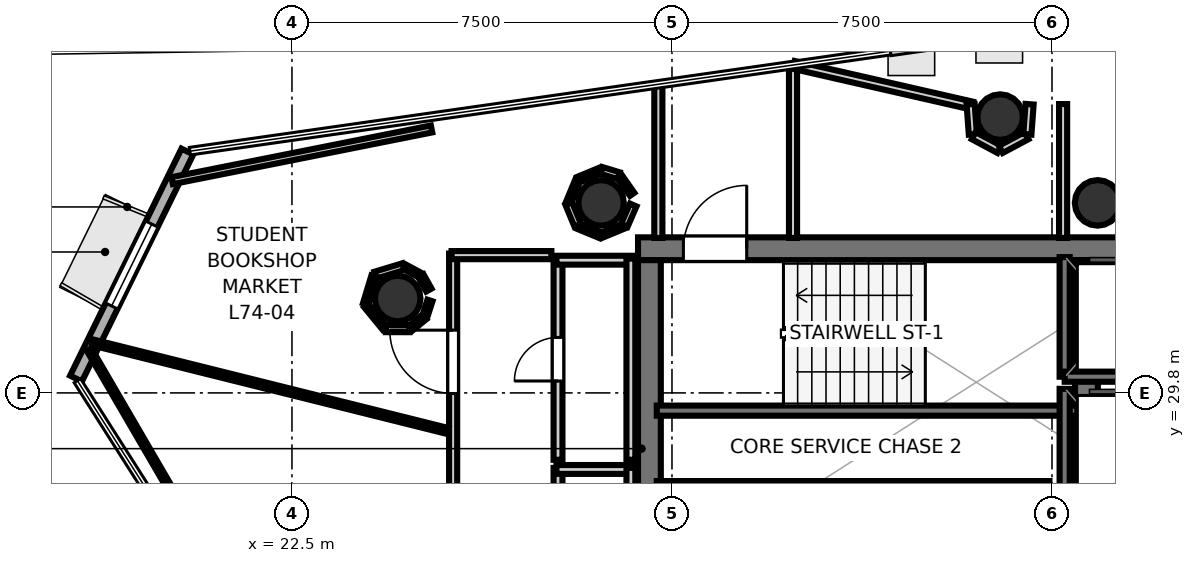
"""IFC4 building model, lengths in metres.
Left out: names, types, materials, properties, quantities, classifications, styles, units other than length and angle.
Written with IfcOpenShell. Run it as: python <this file> out.ifc"""

import sys

from ifc_helpers import new_model, si_unit, direction, frame, frame_2d, origin, origin_2d, place, context, subcontext, project, spatial, rectangle, hollow_circle, extrude, element, fill, save


model = new_model("IFC4")
c1 = context("Model", 3, precision=1e-05, world=origin(), true_north=direction((0.0, 1.0)))
c2 = subcontext(c1, "Body", "Model", "MODEL_VIEW")
j1 = project(units=[si_unit("LENGTHUNIT", "METRE"), si_unit("PLANEANGLEUNIT", "RADIAN")], contexts=[c1])
p1 = place(None, origin())
s1 = spatial("IfcSite", under=j1, at=p1, CompositionType="ELEMENT")
p2 = place(p1, origin())
s2 = spatial("IfcBuilding", under=s1, at=p2, CompositionType="ELEMENT")
p3 = place(p2, frame((0.0, 0.0, 288.0)))
s3 = spatial("IfcBuildingStorey", under=s2, at=p3, CompositionType="ELEMENT", Elevation=288.0)
p4 = place(p3, frame((29.33, 32.645, 0.0), z_axis=(0.0, 0.0, 1.0), x_axis=(1.0, 0.0, 0.0)))
e1 = element("IfcWall", 1, at=p4, inside=s3, PredefinedType="SHEAR", context=c2, shape_type="SweptSolid", body=[
    extrude(rectangle(XDim=10.52, YDim=0.45, at=frame_2d((5.26, 0.0))), origin(), (0.0, 0.0, 1.0), 3.52),
])
p5 = place(p4, frame((0.895, 0.0, 0.0)))
e2 = element("IfcOpeningElement", 2, at=p5, cuts=e1, PredefinedType="OPENING", context=c2, shape_type="SweptSolid", body=[
    extrude(rectangle(XDim=1.25, YDim=2.15, at=frame_2d((0.625, 1.075))), frame((0.0, 0.235, 0.0), z_axis=(0.0, -1.0, 0.0), x_axis=(1.0, 0.0, 0.0)), (0.0, 0.0, 1.0), 0.47),
])
for number, where, z_axis, x_axis in (
    (3, (29.555, 24.98, 0.0), (0.0, 0.0, 1.0), (0.0, 1.0, 0.0)),
    (4, (38.18, 24.98, 0.0), (0.0, 0.0, 1.0), (0.0, 1.0, 0.0)),
):
    element("IfcWall", number, at=place(p3, frame(where, z_axis=z_axis, x_axis=x_axis)), inside=s3, PredefinedType="SHEAR", context=c2, shape_type="SweptSolid", body=[
        extrude(rectangle(XDim=7.44, YDim=0.45, at=frame_2d((3.72, 0.0))), origin(), (0.0, 0.0, 1.0), 3.52),
    ])
for number, where, z_axis, x_axis in (
    (5, (28.6, 33.55, 0.0), (0.0, 0.0, 1.0), (1.0, 0.0, 0.0)),
    (6, (38.4, 33.55, 0.0), (0.0, 0.0, 1.0), (1.0, 0.0, 0.0)),
    (7, (36.476, 35.243, 0.0), (0.0, 0.0, 1.0), (1.0, 0.0, 0.0)),
    (8, (24.587, 31.663, 0.0), (0.0, 0.0, 1.0), (1.0, 0.0, 0.0)),
):
    element("IfcColumn", number, at=place(p3, frame(where, z_axis=z_axis, x_axis=x_axis)), inside=s3, PredefinedType="COLUMN", context=c2, shape_type="SweptSolid", body=[
        extrude(hollow_circle(Radius=0.45, WallThickness=0.025, at=origin_2d()), origin(), (0.0, 0.0, 1.0), 3.7),
    ])
p6 = place(p3, frame((20.436, 34.563, 0.0), z_axis=(0.0, 0.0, 1.0), x_axis=(-0.440488239438, -0.897758381145, 0.0)))
e9 = element("IfcWall", 9, at=p6, inside=s3, PredefinedType="SOLIDWALL", context=c2, shape_type="SweptSolid", body=[
    extrude(rectangle(XDim=4.99, YDim=0.26, at=frame_2d((2.495, 0.0))), origin(), (0.0, 0.0, 1.0), 3.52),
])
p7 = place(p6, frame((1.595, 0.0, 0.85)))
e10 = element("IfcOpeningElement", 10, at=p7, cuts=e9, PredefinedType="OPENING", context=c2, shape_type="SweptSolid", body=[
    extrude(rectangle(XDim=1.8, YDim=2.1, at=frame_2d((0.9, 1.05))), frame((0.0, 0.14, 0.0), z_axis=(0.0, -1.0, 0.0), x_axis=(1.0, 0.0, 0.0)), (0.0, 0.0, 1.0), 0.28),
])
p8 = place(p3, frame((29.7, 29.45, 0.0), z_axis=(0.0, 0.0, 1.0), x_axis=(1.0, 0.0, 0.0)))
e11 = element("IfcWall", 11, at=p8, inside=s3, PredefinedType="SOLIDWALL", context=c2, shape_type="SweptSolid", body=[
    extrude(rectangle(XDim=8.3, YDim=0.2, at=frame_2d((4.15, 0.0))), origin(), (0.0, 0.0, 1.0), 3.52),
])
p9 = place(p3, frame((29.7, 27.96, 0.0), z_axis=(0.0, 0.0, 1.0), x_axis=(1.0, 0.0, 0.0)))
e12 = element("IfcWall", 12, at=p9, inside=s3, PredefinedType="SOLIDWALL", context=c2, shape_type="SweptSolid", body=[
    extrude(rectangle(XDim=7.75, YDim=0.2, at=frame_2d((3.875, 0.0))), origin(), (0.0, 0.0, 1.0), 3.52),
])
p10 = place(p3, frame((37.75, 30.12, 0.0), z_axis=(0.0, 0.0, 1.0), x_axis=(0.0, 1.0, 0.0)))
e13 = element("IfcWall", 13, at=p10, inside=s3, PredefinedType="SOLIDWALL", context=c2, shape_type="SweptSolid", body=[
    extrude(rectangle(XDim=2.36, YDim=0.2, at=frame_2d((1.18, 0.0))), origin(), (0.0, 0.0, 1.0), 3.52),
])
p11 = place(p3, frame((37.75, 30.12, 0.0), z_axis=(0.0, 0.0, 1.0), x_axis=(1.0, 0.0, 0.0)))
e14 = element("IfcWall", 14, at=p11, inside=s3, PredefinedType="SOLIDWALL", context=c2, shape_type="SweptSolid", body=[
    extrude(rectangle(XDim=2.1, YDim=0.2, at=frame_2d((1.05, 0.0))), origin(), (0.0, 0.0, 1.0), 3.52),
])
p12 = place(p3, frame((37.75, 27.52, 0.0), z_axis=(0.0, 0.0, 1.0), x_axis=(0.0, 1.0, 0.0)))
e15 = element("IfcWall", 15, at=p12, inside=s3, PredefinedType="SOLIDWALL", context=c2, shape_type="SweptSolid", body=[
    extrude(rectangle(XDim=2.36, YDim=0.2, at=frame_2d((1.18, 0.0))), origin(), (0.0, 0.0, 1.0), 3.52),
])
p13 = place(p3, frame((29.731, 32.858, 0.0), z_axis=(0.0, 0.0, 1.0), x_axis=(0.0, 1.0, 0.0)))
e16 = element("IfcWall", 16, at=p13, inside=s3, PredefinedType="PARTITIONING", context=c2, shape_type="SweptSolid", body=[
    extrude(rectangle(XDim=3.053, YDim=0.16, at=frame_2d((1.526, 0.0))), origin(), (0.0, 0.0, 1.0), 2.84),
])
p14 = place(p3, frame((32.389, 36.29, 0.0), z_axis=(0.0, 0.0, 1.0), x_axis=(0.0, -1.0, 0.0)))
e17 = element("IfcWall", 17, at=p14, inside=s3, PredefinedType="PARTITIONING", context=c2, shape_type="SweptSolid", body=[
    extrude(rectangle(XDim=3.432, YDim=0.16, at=frame_2d((1.716, 0.0))), origin(), (0.0, 0.0, 1.0), 2.84),
])
p15 = place(p3, frame((27.751, 25.0, 0.0), z_axis=(0.0, 0.0, 1.0), x_axis=(0.0, 1.0, 0.0)))
e18 = element("IfcWall", 18, at=p15, inside=s3, PredefinedType="PLUMBINGWALL", context=c2, shape_type="SweptSolid", body=[
    extrude(rectangle(XDim=3.32, YDim=0.175, at=frame_2d((1.66, 0.0))), origin(), (0.0, 0.0, 1.0), 2.84),
])
p16 = place(p15, frame((1.21, 0.0, 0.0)))
e19 = element("IfcOpeningElement", 19, at=p16, cuts=e18, PredefinedType="OPENING", context=c2, shape_type="SweptSolid", body=[
    extrude(rectangle(XDim=0.9, YDim=2.1, at=frame_2d((0.45, 1.05))), frame((0.0, 0.097, 0.0), z_axis=(0.0, -1.0, 0.0), x_axis=(1.0, 0.0, 0.0)), (0.0, 0.0, 1.0), 0.195),
])
p17 = place(p3, frame((27.72, 28.289, 0.0), z_axis=(0.0, 0.0, 1.0), x_axis=(1.0, 0.0, 0.0)))
e20 = element("IfcWall", 20, at=p17, inside=s3, PredefinedType="PLUMBINGWALL", context=c2, shape_type="SweptSolid", body=[
    extrude(rectangle(XDim=1.5, YDim=0.175, at=frame_2d((0.75, 0.0))), origin(), (0.0, 0.0, 1.0), 2.84),
])
p18 = place(p3, frame((29.189, 28.32, 0.0), z_axis=(0.0, 0.0, 1.0), x_axis=(0.0, -1.0, 0.0)))
e21 = element("IfcWall", 21, at=p18, inside=s3, PredefinedType="PLUMBINGWALL", context=c2, shape_type="SweptSolid", body=[
    extrude(rectangle(XDim=3.32, YDim=0.175, at=frame_2d((1.66, 0.0))), origin(), (0.0, 0.0, 1.0), 2.84),
])
p19 = place(p3, frame((27.751, 28.48, 0.0), z_axis=(0.0, 0.0, 1.0), x_axis=(0.0, 1.0, 0.0)))
e22 = element("IfcWall", 22, at=p19, inside=s3, PredefinedType="PLUMBINGWALL", context=c2, shape_type="SweptSolid", body=[
    extrude(rectangle(XDim=3.97, YDim=0.175, at=frame_2d((1.985, 0.0))), origin(), (0.0, 0.0, 1.0), 2.84),
])
p20 = place(p19, frame((1.555, 0.0, 0.0)))
e23 = element("IfcOpeningElement", 23, at=p20, cuts=e22, PredefinedType="OPENING", context=c2, shape_type="SweptSolid", body=[
    extrude(rectangle(XDim=0.86, YDim=2.05, at=frame_2d((0.43, 1.025))), frame((0.0, 0.097, 0.0), z_axis=(0.0, -1.0, 0.0), x_axis=(1.0, 0.0, 0.0)), (0.0, 0.0, 1.0), 0.195),
])
p21 = place(p3, frame((27.72, 32.419, 0.0), z_axis=(0.0, 0.0, 1.0), x_axis=(1.0, 0.0, 0.0)))
e24 = element("IfcWall", 24, at=p21, inside=s3, PredefinedType="PLUMBINGWALL", context=c2, shape_type="SweptSolid", body=[
    extrude(rectangle(XDim=1.5, YDim=0.175, at=frame_2d((0.75, 0.0))), origin(), (0.0, 0.0, 1.0), 2.84),
])
p22 = place(p3, frame((29.189, 32.45, 0.0), z_axis=(0.0, 0.0, 1.0), x_axis=(0.0, -1.0, 0.0)))
e25 = element("IfcWall", 25, at=p22, inside=s3, PredefinedType="PLUMBINGWALL", context=c2, shape_type="SweptSolid", body=[
    extrude(rectangle(XDim=3.97, YDim=0.175, at=frame_2d((1.985, 0.0))), origin(), (0.0, 0.0, 1.0), 2.84),
])
p23 = place(p3, frame((32.405, 36.272, 0.0), z_axis=(0.0, 0.0, 1.0), x_axis=(0.974921840823, -0.222547532645, 0.0)))
e26 = element("IfcWall", 26, at=p23, inside=s3, PredefinedType="PARTITIONING", context=c2, shape_type="SweptSolid", body=[
    extrude(rectangle(XDim=3.61, YDim=0.16, at=frame_2d((1.805, 0.0))), origin(), (0.0, 0.0, 1.0), 2.84),
])
p24 = place(p3, frame((35.894, 35.498, 0.0), z_axis=(0.0, 0.0, 1.0), x_axis=(0.07354059826, -0.997292224179, 0.0)))
e27 = element("IfcWall", 27, at=p24, inside=s3, PredefinedType="PARTITIONING", context=c2, shape_type="SweptSolid", body=[
    extrude(rectangle(XDim=0.598, YDim=0.16, at=frame_2d((0.299, 0.0))), origin(), (0.0, 0.0, 1.0), 2.84),
])
for number, where, z_axis, x_axis in (
    (28, (35.954, 34.877, 0.0), (0.0, 0.0, 1.0), (0.882, -0.471, 0.0)),
    (29, (36.49, 34.606, 0.0), (0.0, 0.0, 1.0), (0.882, 0.471, 0.0)),
):
    element("IfcWall", number, at=place(p3, frame(where, z_axis=z_axis, x_axis=x_axis)), inside=s3, PredefinedType="PARTITIONING", context=c2, shape_type="SweptSolid", body=[
        extrude(rectangle(XDim=0.575, YDim=0.16, at=frame_2d((0.288, 0.0))), origin(), (0.0, 0.0, 1.0), 2.84),
    ])
p25 = place(p3, frame((37.014, 34.902, 0.0), z_axis=(0.0, 0.0, 1.0), x_axis=(0.073134230676, 0.997322106595, 0.0)))
e30 = element("IfcWall", 30, at=p25, inside=s3, PredefinedType="PARTITIONING", context=c2, shape_type="SweptSolid", body=[
    extrude(rectangle(XDim=0.598, YDim=0.16, at=frame_2d((0.299, 0.0))), origin(), (0.0, 0.0, 1.0), 2.84),
])
p26 = place(p3, frame((37.719, 35.5, 0.0), z_axis=(0.0, 0.0, 1.0), x_axis=(0.0, -1.0, 0.0)))
e31 = element("IfcWall", 31, at=p26, inside=s3, PredefinedType="PARTITIONING", context=c2, shape_type="SweptSolid", body=[
    extrude(rectangle(XDim=2.642, YDim=0.16, at=frame_2d((1.321, 0.0))), origin(), (0.0, 0.0, 1.0), 2.84),
])
p27 = place(p3, frame((25.681, 18.372, 0.0), z_axis=(0.0, 0.0, 1.0), x_axis=(0.0, 1.0, 0.0)))
e32 = element("IfcWall", 32, at=p27, inside=s3, PredefinedType="PARTITIONING", context=c2, shape_type="SweptSolid", body=[
    extrude(rectangle(XDim=14.178, YDim=0.16, at=frame_2d((7.089, 0.0))), origin(), (0.0, 0.0, 1.0), 2.84),
])
p28 = place(p27, frame((11.417, 0.0, 0.0)))
e33 = element("IfcOpeningElement", 33, at=p28, cuts=e32, PredefinedType="OPENING", context=c2, shape_type="SweptSolid", body=[
    extrude(rectangle(XDim=1.25, YDim=2.2, at=frame_2d((0.625, 1.1))), frame((0.0, 0.09, 0.0), z_axis=(0.0, -1.0, 0.0), x_axis=(1.0, 0.0, 0.0)), (0.0, 0.0, 1.0), 0.18),
])
p29 = place(p27, frame((5.215, 0.0, 0.0)))
e34 = element("IfcOpeningElement", 34, at=p29, cuts=e32, PredefinedType="OPENING", context=c2, shape_type="SweptSolid", body=[
    extrude(rectangle(XDim=1.25, YDim=2.2, at=frame_2d((0.625, 1.1))), frame((0.0, 0.09, 0.0), z_axis=(0.0, -1.0, 0.0), x_axis=(1.0, 0.0, 0.0)), (0.0, 0.0, 1.0), 0.18),
])
p30 = place(p3, frame((25.65, 32.519, 0.0), z_axis=(0.0, 0.0, 1.0), x_axis=(1.0, 0.0, 0.0)))
e35 = element("IfcWall", 35, at=p30, inside=s3, PredefinedType="PARTITIONING", context=c2, shape_type="SweptSolid", body=[
    extrude(rectangle(XDim=1.97, YDim=0.16, at=frame_2d((0.985, 0.0))), origin(), (0.0, 0.0, 1.0), 2.84),
])
p31 = place(p3, frame((56.387, 35.955, 0.0), z_axis=(0.0, 0.0, 1.0), x_axis=(-0.547085490545, -0.837076738439, 0.0)))
e36 = element("IfcWall", 36, at=p31, inside=s3, PredefinedType="PARTITIONING", context=c2, shape_type="SweptSolid", body=[
    extrude(rectangle(XDim=34.443, YDim=0.12, at=frame_2d((17.221, 0.0))), origin(), (0.0, 0.0, 1.0), 2.84),
])
p32 = place(p3, frame((25.203, 31.829, 0.0), z_axis=(0.0, 0.0, 1.0), x_axis=(-0.488926990846, 0.872324708823, 0.0)))
e37 = element("IfcWall", 37, at=p32, inside=s3, PredefinedType="PARTITIONING", context=c2, shape_type="SweptSolid", body=[
    extrude(rectangle(XDim=0.322, YDim=0.12, at=frame_2d((0.161, 0.0))), origin(), (0.0, 0.0, 1.0), 2.84),
])
p33 = place(p3, frame((25.033, 32.122, 0.0), z_axis=(0.0, 0.0, 1.0), x_axis=(-0.881817981942, 0.471589913721, 0.0)))
e38 = element("IfcWall", 38, at=p33, inside=s3, PredefinedType="PARTITIONING", context=c2, shape_type="SweptSolid", body=[
    extrude(rectangle(XDim=0.354, YDim=0.105, at=frame_2d((0.177, 0.0))), origin(), (0.0, 0.0, 1.0), 2.84),
])
p34 = place(p3, frame((24.697, 32.291, 0.0), z_axis=(0.0, 0.0, 1.0), x_axis=(-0.956910072495, -0.290384423064, 0.0)))
e39 = element("IfcWall", 39, at=p34, inside=s3, PredefinedType="PARTITIONING", context=c2, shape_type="SweptSolid", body=[
    extrude(rectangle(XDim=0.575, YDim=0.14, at=frame_2d((0.288, 0.0))), origin(), (0.0, 0.0, 1.0), 2.84),
])
p35 = place(p3, frame((24.126, 32.103, 0.0), z_axis=(0.0, 0.0, 1.0), x_axis=(-0.290384423064, -0.956910072495, 0.0)))
e40 = element("IfcWall", 40, at=p35, inside=s3, PredefinedType="PARTITIONING", context=c2, shape_type="SweptSolid", body=[
    extrude(rectangle(XDim=0.575, YDim=0.12, at=frame_2d((0.288, 0.0))), origin(), (0.0, 0.0, 1.0), 2.84),
])
p36 = place(p3, frame((23.965, 31.524, 0.0), z_axis=(0.0, 0.0, 1.0), x_axis=(0.634277575631, -0.77310539841, 0.0)))
e41 = element("IfcWall", 41, at=p36, inside=s3, PredefinedType="PARTITIONING", context=c2, shape_type="SweptSolid", body=[
    extrude(rectangle(XDim=0.575, YDim=0.105, at=frame_2d((0.288, 0.0))), origin(), (0.0, 0.0, 1.0), 2.84),
])
p37 = place(p3, frame((24.354, 31.068, 0.0), z_axis=(0.0, 0.0, 1.0), x_axis=(1.0, 0.0, 0.0)))
e42 = element("IfcWall", 42, at=p37, inside=s3, PredefinedType="PARTITIONING", context=c2, shape_type="SweptSolid", body=[
    extrude(rectangle(XDim=0.467, YDim=0.14, at=frame_2d((0.233, 0.0))), origin(), (0.0, 0.0, 1.0), 2.84),
])
p38 = place(p3, frame((24.84, 31.075, 0.0), z_axis=(0.0, 0.0, 1.0), x_axis=(0.773281307259, 0.634063103992, 0.0)))
e43 = element("IfcWall", 43, at=p38, inside=s3, PredefinedType="PARTITIONING", context=c2, shape_type="SweptSolid", body=[
    extrude(rectangle(XDim=0.354, YDim=0.12, at=frame_2d((0.177, 0.0))), origin(), (0.0, 0.0, 1.0), 2.84),
])
p39 = place(p3, frame((25.124, 31.315, 0.0), z_axis=(0.0, 0.0, 1.0), x_axis=(0.306761714687, 0.951786347035, 0.0)))
e44 = element("IfcWall", 44, at=p39, inside=s3, PredefinedType="PARTITIONING", context=c2, shape_type="SweptSolid", body=[
    extrude(rectangle(XDim=0.325, YDim=0.105, at=frame_2d((0.163, 0.0))), origin(), (0.0, 0.0, 1.0), 2.84),
])
p40 = place(p3, frame((25.577, 29.048, 0.0), z_axis=(0.0, 0.0, 1.0), x_axis=(-0.970297325038, 0.241915483226, 0.0)))
e45 = element("IfcWall", 45, at=p40, inside=s3, PredefinedType="PARTITIONING", context=c2, shape_type="SweptSolid", body=[
    extrude(rectangle(XDim=7.226, YDim=0.12, at=frame_2d((3.613, 0.0))), origin(), (0.0, 0.0, 1.0), 2.84),
])
p41 = place(p3, frame((20.136, 33.989, 0.0), z_axis=(0.0, 0.0, 1.0), x_axis=(0.980720741486, 0.195414501046, 0.0)))
e46 = element("IfcWall", 46, at=p41, inside=s3, PredefinedType="PARTITIONING", context=c2, shape_type="SweptSolid", body=[
    extrude(rectangle(XDim=5.22, YDim=0.14, at=frame_2d((2.61, 0.0))), origin(), (0.0, 0.0, 1.0), 2.84),
])
p42 = place(p3, frame((29.214, 33.719, 0.0), z_axis=(0.0, 0.0, 1.0), x_axis=(-0.57410245878, 0.818783467605, 0.0)))
e47 = element("IfcWall", 47, at=p42, inside=s3, PredefinedType="PARTITIONING", context=c2, shape_type="SweptSolid", body=[
    extrude(rectangle(XDim=0.435, YDim=0.105, at=frame_2d((0.218, 0.0))), origin(), (0.0, 0.0, 1.0), 2.84),
])
p43 = place(p3, frame((28.948, 34.087, 0.0), z_axis=(0.0, 0.0, 1.0), x_axis=(-0.957007018611, 0.290064762301, 0.0)))
e48 = element("IfcWall", 48, at=p43, inside=s3, PredefinedType="PARTITIONING", context=c2, shape_type="SweptSolid", body=[
    extrude(rectangle(XDim=0.354, YDim=0.14, at=frame_2d((0.177, 0.0))), origin(), (0.0, 0.0, 1.0), 2.84),
])
p44 = place(p3, frame((28.588, 34.189, 0.0), z_axis=(0.0, 0.0, 1.0), x_axis=(-0.923863886655, -0.382721202621, 0.0)))
e49 = element("IfcWall", 49, at=p44, inside=s3, PredefinedType="PARTITIONING", context=c2, shape_type="SweptSolid", body=[
    extrude(rectangle(XDim=0.467, YDim=0.12, at=frame_2d((0.233, 0.0))), origin(), (0.0, 0.0, 1.0), 2.84),
])
p45 = place(p3, frame((28.14, 33.993, 0.0), z_axis=(0.0, 0.0, 1.0), x_axis=(-0.382459617246, -0.923972208011, 0.0)))
e50 = element("IfcWall", 50, at=p45, inside=s3, PredefinedType="PARTITIONING", context=c2, shape_type="SweptSolid", body=[
    extrude(rectangle(XDim=0.467, YDim=0.105, at=frame_2d((0.233, 0.0))), origin(), (0.0, 0.0, 1.0), 2.84),
])
p46 = place(p3, frame((27.961, 33.538, 0.0), z_axis=(0.0, 0.0, 1.0), x_axis=(0.382274809242, -0.924048683901, 0.0)))
e51 = element("IfcWall", 51, at=p46, inside=s3, PredefinedType="PARTITIONING", context=c2, shape_type="SweptSolid", body=[
    extrude(rectangle(XDim=0.467, YDim=0.14, at=frame_2d((0.233, 0.0))), origin(), (0.0, 0.0, 1.0), 2.84),
])
p47 = place(p3, frame((28.157, 33.09, 0.0), z_axis=(0.0, 0.0, 1.0), x_axis=(0.923863886655, -0.382721202621, 0.0)))
e52 = element("IfcWall", 52, at=p47, inside=s3, PredefinedType="PARTITIONING", context=c2, shape_type="SweptSolid", body=[
    extrude(rectangle(XDim=0.467, YDim=0.12, at=frame_2d((0.233, 0.0))), origin(), (0.0, 0.0, 1.0), 2.84),
])
p48 = place(p3, frame((28.612, 32.911, 0.0), z_axis=(0.0, 0.0, 1.0), x_axis=(0.923863886655, 0.382721202621, 0.0)))
e53 = element("IfcWall", 53, at=p48, inside=s3, PredefinedType="PARTITIONING", context=c2, shape_type="SweptSolid", body=[
    extrude(rectangle(XDim=0.467, YDim=0.105, at=frame_2d((0.233, 0.0))), origin(), (0.0, 0.0, 1.0), 2.84),
])
p49 = place(p3, frame((29.06, 33.106, 0.0), z_axis=(0.0, 0.0, 1.0), x_axis=(0.400352069216, 0.916361402872, 0.0)))
e54 = element("IfcWall", 54, at=p49, inside=s3, PredefinedType="PARTITIONING", context=c2, shape_type="SweptSolid", body=[
    extrude(rectangle(XDim=0.439, YDim=0.14, at=frame_2d((0.219, 0.0))), origin(), (0.0, 0.0, 1.0), 2.84),
])
p50 = place(p3, frame((22.117, 24.438, 0.0), z_axis=(0.0, 0.0, 1.0), x_axis=(-0.50301807404, 0.864275891825, 0.0)))
e55 = element("IfcWall", 55, at=p50, inside=s3, PredefinedType="PARTITIONING", context=c2, shape_type="SweptSolid", body=[
    extrude(rectangle(XDim=7.192, YDim=0.105, at=frame_2d((3.596, 0.0))), origin(), (0.0, 0.0, 1.0), 2.84),
])
p51 = place(p5, origin())
e56 = element("IfcDoor", 56, at=p51, inside=s3, OperationType="SINGLE_SWING_RIGHT", PredefinedType="DOOR", context=c2, shape_type="SweptSolid", body=[
    extrude(rectangle(XDim=1.25, YDim=2.15, at=frame_2d((0.625, 1.075))), frame((0.0, 0.025, 0.0), z_axis=(0.0, -1.0, 0.0), x_axis=(1.0, 0.0, 0.0)), (0.0, 0.0, 1.0), 0.05),
])
fill(e2, e56)
p52 = place(p20, origin())
e57 = element("IfcDoor", 57, at=p52, inside=s3, OperationType="SINGLE_SWING_LEFT", PredefinedType="DOOR", context=c2, shape_type="SweptSolid", body=[
    extrude(rectangle(XDim=0.86, YDim=2.05, at=frame_2d((0.43, 1.025))), frame((0.0, 0.025, 0.0), z_axis=(0.0, -1.0, 0.0), x_axis=(1.0, 0.0, 0.0)), (0.0, 0.0, 1.0), 0.05),
])
fill(e23, e57)
p53 = place(p28, origin())
e58 = element("IfcDoor", 58, at=p53, inside=s3, OperationType="SINGLE_SWING_RIGHT", PredefinedType="DOOR", context=c2, shape_type="SweptSolid", body=[
    extrude(rectangle(XDim=1.25, YDim=2.2, at=frame_2d((0.625, 1.1))), frame((0.0, 0.025, 0.0), z_axis=(0.0, -1.0, 0.0), x_axis=(1.0, 0.0, 0.0)), (0.0, 0.0, 1.0), 0.05),
])
fill(e33, e58)
p54 = place(p7, origin())
e59 = element("IfcWindow", 59, at=p54, inside=s3, PartitioningType="SINGLE_PANEL", PredefinedType="WINDOW", context=c2, shape_type="SweptSolid", body=[
    extrude(rectangle(XDim=1.8, YDim=2.1, at=frame_2d((0.9, 1.05))), frame((0.0, 0.03, 0.0), z_axis=(0.0, -1.0, 0.0), x_axis=(1.0, 0.0, 0.0)), (0.0, 0.0, 1.0), 0.06),
])
fill(e10, e59)
save(model, sys.argv[1])
